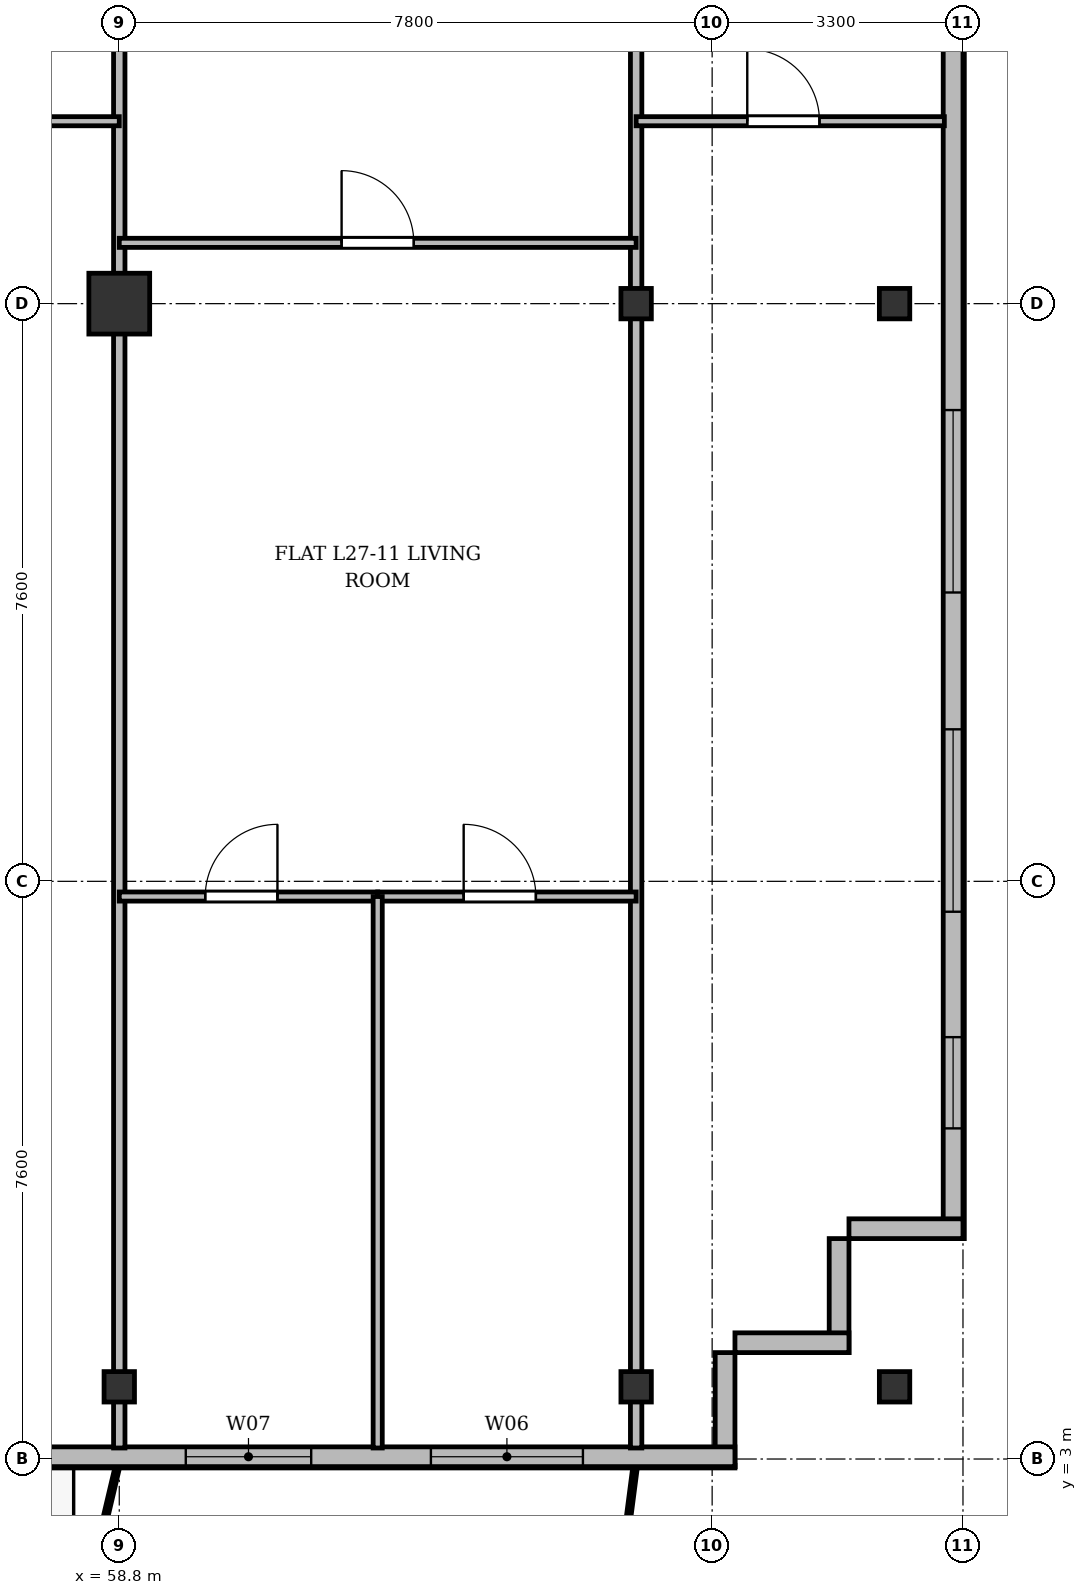
"""IFC4 building model, lengths in metres.
Left out: names, types, materials, properties, quantities, classifications, styles, units other than length and angle.
Written with IfcOpenShell. Run it as: python <this file> out.ifc"""

import sys

from ifc_helpers import new_model, si_unit, direction, frame, frame_2d, origin, origin_2d, place, context, subcontext, project, spatial, rectangle, i_section, extrude, source, transform, mapped, element, fill, save


model = new_model("IFC4")
c1 = context("Model", 3, precision=1e-05, world=origin(), true_north=direction((0.0, 1.0)))
c2 = subcontext(c1, "Body", "Model", "MODEL_VIEW")
j1 = project(units=[si_unit("LENGTHUNIT", "METRE"), si_unit("PLANEANGLEUNIT", "RADIAN")], contexts=[c1])
p1 = place(None, origin())
s1 = spatial("IfcSite", under=j1, at=p1, CompositionType="ELEMENT")
p2 = place(p1, origin())
s2 = spatial("IfcBuilding", under=s1, at=p2, CompositionType="ELEMENT")
p3 = place(p2, frame((0.0, 0.0, 106.9)))
s3 = spatial("IfcBuildingStorey", under=s2, at=p3, CompositionType="ELEMENT", Elevation=106.9)
m1 = source(origin(), c2, "Body", "SweptSolid", [
    extrude(i_section(OverallWidth=0.4, OverallDepth=0.4, WebThickness=0.022, FlangeThickness=0.035, at=origin_2d()), origin(), (0.0, 0.0, 1.0), 3.6),
])
p4 = place(p3, frame((58.8, 3.95, 0.0), z_axis=(0.0, 0.0, 1.0), x_axis=(1.0, 0.0, 0.0)))
e1 = element("IfcColumn", 1, at=p4, inside=s3, PredefinedType="COLUMN", context=c2, shape_type="MappedRepresentation", body=[
    mapped(m1, transform((0.0, 0.0, 0.0), x_axis=(1.0, 0.0, 0.0), y_axis=(0.0, 1.0, 0.0), z_axis=(0.0, 0.0, 1.0), scale=1.0)),
])
m2 = source(origin(), c2, "Body", "SweptSolid", [
    extrude(rectangle(XDim=0.8, YDim=0.8, at=origin_2d()), origin(), (0.0, 0.0, 1.0), 3.6),
])
p5 = place(p3, frame((58.8, 18.2, 0.0), z_axis=(0.0, 0.0, 1.0), x_axis=(1.0, 0.0, 0.0)))
e2 = element("IfcColumn", 2, at=p5, inside=s3, PredefinedType="COLUMN", context=c2, shape_type="MappedRepresentation", body=[
    mapped(m2, transform((0.0, 0.0, 0.0), x_axis=(1.0, 0.0, 0.0), y_axis=(0.0, 1.0, 0.0), z_axis=(0.0, 0.0, 1.0), scale=1.0)),
])
for number, where, z_axis, x_axis in (
    (3, (65.6, 3.95, 0.0), (0.0, 0.0, 1.0), (1.0, 0.0, 0.0)),
    (4, (65.6, 18.2, 0.0), (0.0, 0.0, 1.0), (1.0, 0.0, 0.0)),
    (5, (69.0, 3.95, 0.0), (0.0, 0.0, 1.0), (1.0, 0.0, 0.0)),
    (6, (69.0, 18.2, 0.0), (0.0, 0.0, 1.0), (1.0, 0.0, 0.0)),
):
    element("IfcColumn", number, at=place(p3, frame(where, z_axis=z_axis, x_axis=x_axis)), inside=s3, PredefinedType="COLUMN", context=c2, shape_type="MappedRepresentation", body=[
        mapped(m1, transform((0.0, 0.0, 0.0), x_axis=(1.0, 0.0, 0.0), y_axis=(0.0, 1.0, 0.0), z_axis=(0.0, 0.0, 1.0), scale=1.0)),
    ])
p6 = place(p3, frame((69.77, 45.5, 0.0), z_axis=(0.0, 0.0, 1.0), x_axis=(0.0, -1.0, 0.0)))
e7 = element("IfcWall", 7, at=p6, inside=s3, PredefinedType="SOLIDWALL", context=c2, shape_type="SweptSolid", body=[
    extrude(rectangle(XDim=39.6, YDim=0.26, at=frame_2d((19.8, 0.0))), origin(), (0.0, 0.0, 1.0), 3.34),
])
p7 = place(p6, frame((36.95, 0.0, 0.92)))
e8 = element("IfcOpeningElement", 8, at=p7, cuts=e7, PredefinedType="OPENING", context=c2, shape_type="SweptSolid", body=[
    extrude(rectangle(XDim=1.2, YDim=1.65, at=frame_2d((0.6, 0.825))), frame((0.0, 0.14, 0.0), z_axis=(0.0, -1.0, 0.0), x_axis=(1.0, 0.0, 0.0)), (0.0, 0.0, 1.0), 0.28),
])
p8 = place(p6, frame((32.9, 0.0, 0.92)))
e9 = element("IfcOpeningElement", 9, at=p8, cuts=e7, PredefinedType="OPENING", context=c2, shape_type="SweptSolid", body=[
    extrude(rectangle(XDim=2.4, YDim=2.1, at=frame_2d((1.2, 1.05))), frame((0.0, 0.14, 0.0), z_axis=(0.0, -1.0, 0.0), x_axis=(1.0, 0.0, 0.0)), (0.0, 0.0, 1.0), 0.28),
])
p9 = place(p6, frame((28.7, 0.0, 0.92)))
e10 = element("IfcOpeningElement", 10, at=p9, cuts=e7, PredefinedType="OPENING", context=c2, shape_type="SweptSolid", body=[
    extrude(rectangle(XDim=2.4, YDim=2.1, at=frame_2d((1.2, 1.05))), frame((0.0, 0.14, 0.0), z_axis=(0.0, -1.0, 0.0), x_axis=(1.0, 0.0, 0.0)), (0.0, 0.0, 1.0), 0.28),
])
p10 = place(p6, frame((21.5, 0.0, 0.92)))
e11 = element("IfcOpeningElement", 11, at=p10, cuts=e7, PredefinedType="OPENING", context=c2, shape_type="SweptSolid", body=[
    extrude(rectangle(XDim=2.4, YDim=2.1, at=frame_2d((1.2, 1.05))), frame((0.0, 0.14, 0.0), z_axis=(0.0, -1.0, 0.0), x_axis=(1.0, 0.0, 0.0)), (0.0, 0.0, 1.0), 0.28),
])
p11 = place(p6, frame((7.5, 0.0, 0.92)))
e12 = element("IfcOpeningElement", 12, at=p11, cuts=e7, PredefinedType="OPENING", context=c2, shape_type="SweptSolid", body=[
    extrude(rectangle(XDim=2.4, YDim=2.1, at=frame_2d((1.2, 1.05))), frame((0.0, 0.14, 0.0), z_axis=(0.0, -1.0, 0.0), x_axis=(1.0, 0.0, 0.0)), (0.0, 0.0, 1.0), 0.28),
])
p12 = place(p6, frame((4.5, 0.0, 0.92)))
e13 = element("IfcOpeningElement", 13, at=p12, cuts=e7, PredefinedType="OPENING", context=c2, shape_type="SweptSolid", body=[
    extrude(rectangle(XDim=1.2, YDim=1.65, at=frame_2d((0.6, 0.825))), frame((0.0, 0.14, 0.0), z_axis=(0.0, -1.0, 0.0), x_axis=(1.0, 0.0, 0.0)), (0.0, 0.0, 1.0), 0.28),
])
p13 = place(p6, frame((1.15, 0.0, 0.92)))
e14 = element("IfcOpeningElement", 14, at=p13, cuts=e7, PredefinedType="OPENING", context=c2, shape_type="SweptSolid", body=[
    extrude(rectangle(XDim=1.2, YDim=1.65, at=frame_2d((0.6, 0.825))), frame((0.0, 0.14, 0.0), z_axis=(0.0, -1.0, 0.0), x_axis=(1.0, 0.0, 0.0)), (0.0, 0.0, 1.0), 0.28),
])
p14 = place(p3, frame((69.9, 6.03, 0.0), z_axis=(0.0, 0.0, 1.0), x_axis=(-1.0, 0.0, 0.0)))
e15 = element("IfcWall", 15, at=p14, inside=s3, PredefinedType="SOLIDWALL", context=c2, shape_type="SweptSolid", body=[
    extrude(rectangle(XDim=1.5, YDim=0.26, at=frame_2d((0.75, 0.0))), origin(), (0.0, 0.0, 1.0), 2.84),
])
for number, where, z_axis, x_axis in (
    (16, (68.27, 5.9, 0.0), (0.0, 0.0, 1.0), (0.0, -1.0, 0.0)),
    (17, (68.4, 4.53, 0.0), (0.0, 0.0, 1.0), (-1.0, 0.0, 0.0)),
):
    element("IfcWall", number, at=place(p3, frame(where, z_axis=z_axis, x_axis=x_axis)), inside=s3, PredefinedType="SOLIDWALL", context=c2, shape_type="SweptSolid", body=[
        extrude(rectangle(XDim=1.5, YDim=0.26, at=frame_2d((0.75, 0.0))), origin(), (0.0, 0.0, 1.0), 3.34),
    ])
p15 = place(p3, frame((66.77, 4.4, 0.0), z_axis=(0.0, 0.0, 1.0), x_axis=(0.0, -1.0, 0.0)))
e18 = element("IfcWall", 18, at=p15, inside=s3, PredefinedType="SOLIDWALL", context=c2, shape_type="SweptSolid", body=[
    extrude(rectangle(XDim=1.5, YDim=0.26, at=frame_2d((0.75, 0.0))), origin(), (0.0, 0.0, 1.0), 2.752),
])
p16 = place(p3, frame((66.9, 3.03, 0.0), z_axis=(0.0, 0.0, 1.0), x_axis=(-1.0, 0.0, 0.0)))
e19 = element("IfcWall", 19, at=p16, inside=s3, PredefinedType="SOLIDWALL", context=c2, shape_type="SweptSolid", body=[
    extrude(rectangle(XDim=59.4, YDim=0.26, at=frame_2d((29.7, 0.0))), origin(), (0.0, 0.0, 1.0), 3.34),
])
p17 = place(p16, frame((2.0, 0.0, 0.9)))
e20 = element("IfcOpeningElement", 20, at=p17, cuts=e19, PredefinedType="OPENING", context=c2, shape_type="SweptSolid", body=[
    extrude(rectangle(XDim=2.0, YDim=1.95, at=frame_2d((1.0, 0.975))), frame((0.0, 0.14, 0.0), z_axis=(0.0, -1.0, 0.0), x_axis=(1.0, 0.0, 0.0)), (0.0, 0.0, 1.0), 0.28),
])
p18 = place(p16, frame((5.575, 0.0, 0.9)))
e21 = element("IfcOpeningElement", 21, at=p18, cuts=e19, PredefinedType="OPENING", context=c2, shape_type="SweptSolid", body=[
    extrude(rectangle(XDim=1.65, YDim=1.85, at=frame_2d((0.825, 0.925))), frame((0.0, 0.14, 0.0), z_axis=(0.0, -1.0, 0.0), x_axis=(1.0, 0.0, 0.0)), (0.0, 0.0, 1.0), 0.28),
])
p19 = place(p16, frame((9.213, 0.0, 0.0)))
e22 = element("IfcOpeningElement", 22, at=p19, cuts=e19, PredefinedType="OPENING", context=c2, shape_type="SweptSolid", body=[
    extrude(rectangle(XDim=1.2, YDim=2.2, at=frame_2d((0.6, 1.1))), frame((0.0, 0.14, 0.0), z_axis=(0.0, -1.0, 0.0), x_axis=(1.0, 0.0, 0.0)), (0.0, 0.0, 1.0), 0.28),
])
p20 = place(p16, frame((12.8, 0.0, 0.9)))
e23 = element("IfcOpeningElement", 23, at=p20, cuts=e19, PredefinedType="OPENING", context=c2, shape_type="SweptSolid", body=[
    extrude(rectangle(XDim=2.2, YDim=1.8, at=frame_2d((1.1, 0.9))), frame((0.0, 0.14, 0.0), z_axis=(0.0, -1.0, 0.0), x_axis=(1.0, 0.0, 0.0)), (0.0, 0.0, 1.0), 0.28),
])
p21 = place(p16, frame((16.95, 0.0, 0.9)))
e24 = element("IfcOpeningElement", 24, at=p21, cuts=e19, PredefinedType="OPENING", context=c2, shape_type="SweptSolid", body=[
    extrude(rectangle(XDim=1.5, YDim=1.75, at=frame_2d((0.75, 0.875))), frame((0.0, 0.14, 0.0), z_axis=(0.0, -1.0, 0.0), x_axis=(1.0, 0.0, 0.0)), (0.0, 0.0, 1.0), 0.28),
])
p22 = place(p16, frame((20.3, 0.0, 0.9)))
e25 = element("IfcOpeningElement", 25, at=p22, cuts=e19, PredefinedType="OPENING", context=c2, shape_type="SweptSolid", body=[
    extrude(rectangle(XDim=2.0, YDim=1.95, at=frame_2d((1.0, 0.975))), frame((0.0, 0.14, 0.0), z_axis=(0.0, -1.0, 0.0), x_axis=(1.0, 0.0, 0.0)), (0.0, 0.0, 1.0), 0.28),
])
p23 = place(p16, frame((25.575, 0.0, 0.9)))
e26 = element("IfcOpeningElement", 26, at=p23, cuts=e19, PredefinedType="OPENING", context=c2, shape_type="SweptSolid", body=[
    extrude(rectangle(XDim=1.65, YDim=1.85, at=frame_2d((0.825, 0.925))), frame((0.0, 0.14, 0.0), z_axis=(0.0, -1.0, 0.0), x_axis=(1.0, 0.0, 0.0)), (0.0, 0.0, 1.0), 0.28),
])
p24 = place(p16, frame((32.1, 0.0, 0.9)))
e27 = element("IfcOpeningElement", 27, at=p24, cuts=e19, PredefinedType="OPENING", context=c2, shape_type="SweptSolid", body=[
    extrude(rectangle(XDim=1.8, YDim=1.8, at=frame_2d((0.9, 0.9))), frame((0.0, 0.14, 0.0), z_axis=(0.0, -1.0, 0.0), x_axis=(1.0, 0.0, 0.0)), (0.0, 0.0, 1.0), 0.28),
])
p25 = place(p16, frame((37.584, 0.0, 0.0)))
e28 = element("IfcOpeningElement", 28, at=p25, cuts=e19, PredefinedType="OPENING", context=c2, shape_type="SweptSolid", body=[
    extrude(rectangle(XDim=1.2, YDim=2.2, at=frame_2d((0.6, 1.1))), frame((0.0, 0.14, 0.0), z_axis=(0.0, -1.0, 0.0), x_axis=(1.0, 0.0, 0.0)), (0.0, 0.0, 1.0), 0.28),
])
p26 = place(p16, frame((40.85, 0.0, 0.9)))
e29 = element("IfcOpeningElement", 29, at=p26, cuts=e19, PredefinedType="OPENING", context=c2, shape_type="SweptSolid", body=[
    extrude(rectangle(XDim=1.5, YDim=1.75, at=frame_2d((0.75, 0.875))), frame((0.0, 0.14, 0.0), z_axis=(0.0, -1.0, 0.0), x_axis=(1.0, 0.0, 0.0)), (0.0, 0.0, 1.0), 0.28),
])
p27 = place(p16, frame((46.4, 0.0, 0.9)))
e30 = element("IfcOpeningElement", 30, at=p27, cuts=e19, PredefinedType="OPENING", context=c2, shape_type="SweptSolid", body=[
    extrude(rectangle(XDim=2.0, YDim=1.95, at=frame_2d((1.0, 0.975))), frame((0.0, 0.14, 0.0), z_axis=(0.0, -1.0, 0.0), x_axis=(1.0, 0.0, 0.0)), (0.0, 0.0, 1.0), 0.28),
])
p28 = place(p16, frame((55.817, 0.0, 0.0)))
e31 = element("IfcOpeningElement", 31, at=p28, cuts=e19, PredefinedType="OPENING", context=c2, shape_type="SweptSolid", body=[
    extrude(rectangle(XDim=1.2, YDim=2.2, at=frame_2d((0.6, 1.1))), frame((0.0, 0.14, 0.0), z_axis=(0.0, -1.0, 0.0), x_axis=(1.0, 0.0, 0.0)), (0.0, 0.0, 1.0), 0.28),
])
for number, where, z_axis, x_axis in (
    (32, (58.8, 3.145, 0.0), (0.0, 0.0, 1.0), (0.0, 1.0, 0.0)),
    (33, (65.6, 3.145, 0.0), (0.0, 0.0, 1.0), (0.0, 1.0, 0.0)),
):
    element("IfcWall", number, at=place(p3, frame(where, z_axis=z_axis, x_axis=x_axis)), inside=s3, PredefinedType="PARTITIONING", context=c2, shape_type="SweptSolid", body=[
        extrude(rectangle(XDim=24.455, YDim=0.15, at=frame_2d((12.228, 0.0))), origin(), (0.0, 0.0, 1.0), 2.84),
    ])
p29 = place(p3, frame((55.0, 20.6, 0.0), z_axis=(0.0, 0.0, 1.0), x_axis=(1.0, 0.0, 0.0)))
e34 = element("IfcWall", 34, at=p29, inside=s3, PredefinedType="PARTITIONING", context=c2, shape_type="SweptSolid", body=[
    extrude(rectangle(XDim=3.8, YDim=0.12, at=frame_2d((1.9, 0.0))), origin(), (0.0, 0.0, 1.0), 2.84),
])
p30 = place(p29, frame((1.33, 0.0, 0.0)))
e35 = element("IfcOpeningElement", 35, at=p30, cuts=e34, PredefinedType="OPENING", context=c2, shape_type="SweptSolid", body=[
    extrude(rectangle(XDim=0.95, YDim=2.15, at=frame_2d((0.475, 1.075))), frame((0.0, 0.07, 0.0), z_axis=(0.0, -1.0, 0.0), x_axis=(1.0, 0.0, 0.0)), (0.0, 0.0, 1.0), 0.14),
])
p31 = place(p3, frame((58.8, 19.0, 0.0), z_axis=(0.0, 0.0, 1.0), x_axis=(1.0, 0.0, 0.0)))
e36 = element("IfcWall", 36, at=p31, inside=s3, PredefinedType="PARTITIONING", context=c2, shape_type="SweptSolid", body=[
    extrude(rectangle(XDim=6.8, YDim=0.12, at=frame_2d((3.4, 0.0))), origin(), (0.0, 0.0, 1.0), 2.84),
])
p32 = place(p31, frame((2.925, 0.0, 0.0)))
e37 = element("IfcOpeningElement", 37, at=p32, cuts=e36, PredefinedType="OPENING", context=c2, shape_type="SweptSolid", body=[
    extrude(rectangle(XDim=0.95, YDim=2.15, at=frame_2d((0.475, 1.075))), frame((0.0, 0.07, 0.0), z_axis=(0.0, -1.0, 0.0), x_axis=(1.0, 0.0, 0.0)), (0.0, 0.0, 1.0), 0.14),
])
p33 = place(p3, frame((58.8, 10.4, 0.0), z_axis=(0.0, 0.0, 1.0), x_axis=(1.0, 0.0, 0.0)))
e38 = element("IfcWall", 38, at=p33, inside=s3, PredefinedType="PARTITIONING", context=c2, shape_type="SweptSolid", body=[
    extrude(rectangle(XDim=3.4, YDim=0.12, at=frame_2d((1.7, 0.0))), origin(), (0.0, 0.0, 1.0), 2.84),
])
p34 = place(p33, frame((1.131, 0.0, 0.0)))
e39 = element("IfcOpeningElement", 39, at=p34, cuts=e38, PredefinedType="OPENING", context=c2, shape_type="SweptSolid", body=[
    extrude(rectangle(XDim=0.95, YDim=2.15, at=frame_2d((0.475, 1.075))), frame((0.0, 0.07, 0.0), z_axis=(0.0, -1.0, 0.0), x_axis=(1.0, 0.0, 0.0)), (0.0, 0.0, 1.0), 0.14),
])
p35 = place(p3, frame((62.2, 10.4, 0.0), z_axis=(0.0, 0.0, 1.0), x_axis=(1.0, 0.0, 0.0)))
e40 = element("IfcWall", 40, at=p35, inside=s3, PredefinedType="PARTITIONING", context=c2, shape_type="SweptSolid", body=[
    extrude(rectangle(XDim=3.4, YDim=0.12, at=frame_2d((1.7, 0.0))), origin(), (0.0, 0.0, 1.0), 2.84),
])
p36 = place(p35, frame((1.131, 0.0, 0.0)))
e41 = element("IfcOpeningElement", 41, at=p36, cuts=e40, PredefinedType="OPENING", context=c2, shape_type="SweptSolid", body=[
    extrude(rectangle(XDim=0.95, YDim=2.15, at=frame_2d((0.475, 1.075))), frame((0.0, 0.07, 0.0), z_axis=(0.0, -1.0, 0.0), x_axis=(1.0, 0.0, 0.0)), (0.0, 0.0, 1.0), 0.14),
])
p37 = place(p3, frame((62.2, 3.145, 0.0), z_axis=(0.0, 0.0, 1.0), x_axis=(0.0, 1.0, 0.0)))
e42 = element("IfcWall", 42, at=p37, inside=s3, PredefinedType="PARTITIONING", context=c2, shape_type="SweptSolid", body=[
    extrude(rectangle(XDim=7.255, YDim=0.12, at=frame_2d((3.627, 0.0))), origin(), (0.0, 0.0, 1.0), 2.752),
])
p38 = place(p3, frame((65.6, 20.6, 0.0), z_axis=(0.0, 0.0, 1.0), x_axis=(1.0, 0.0, 0.0)))
e43 = element("IfcWall", 43, at=p38, inside=s3, PredefinedType="PARTITIONING", context=c2, shape_type="SweptSolid", body=[
    extrude(rectangle(XDim=4.055, YDim=0.12, at=frame_2d((2.027, 0.0))), origin(), (0.0, 0.0, 1.0), 2.84),
])
p39 = place(p38, frame((1.462, 0.0, 0.0)))
e44 = element("IfcOpeningElement", 44, at=p39, cuts=e43, PredefinedType="OPENING", context=c2, shape_type="SweptSolid", body=[
    extrude(rectangle(XDim=0.95, YDim=2.15, at=frame_2d((0.475, 1.075))), frame((0.0, 0.07, 0.0), z_axis=(0.0, -1.0, 0.0), x_axis=(1.0, 0.0, 0.0)), (0.0, 0.0, 1.0), 0.14),
])
m3 = source(origin(), c2, "Body", "SweptSolid", [
    extrude(rectangle(XDim=1.2, YDim=1.65, at=frame_2d((0.6, 0.825))), frame((0.0, 0.03, 0.0), z_axis=(0.0, -1.0, 0.0), x_axis=(1.0, 0.0, 0.0)), (0.0, 0.0, 1.0), 0.06),
])
p40 = place(p7, origin())
e45 = element("IfcWindow", 45, at=p40, inside=s3, PartitioningType="SINGLE_PANEL", PredefinedType="WINDOW", context=c2, shape_type="MappedRepresentation", body=[
    mapped(m3, transform((0.0, 0.0, 0.0), x_axis=(1.0, 0.0, 0.0), y_axis=(0.0, 1.0, 0.0), z_axis=(0.0, 0.0, 1.0), scale=1.0)),
])
fill(e8, e45)
m4 = source(origin(), c2, "Body", "SweptSolid", [
    extrude(rectangle(XDim=2.4, YDim=2.1, at=frame_2d((1.2, 1.05))), frame((0.0, 0.03, 0.0), z_axis=(0.0, -1.0, 0.0), x_axis=(1.0, 0.0, 0.0)), (0.0, 0.0, 1.0), 0.06),
])
p41 = place(p8, origin())
e46 = element("IfcWindow", 46, at=p41, inside=s3, PartitioningType="SINGLE_PANEL", PredefinedType="WINDOW", context=c2, shape_type="MappedRepresentation", body=[
    mapped(m4, transform((0.0, 0.0, 0.0), x_axis=(1.0, 0.0, 0.0), y_axis=(0.0, 1.0, 0.0), z_axis=(0.0, 0.0, 1.0), scale=1.0)),
])
fill(e9, e46)
p42 = place(p9, origin())
e47 = element("IfcWindow", 47, at=p42, inside=s3, PartitioningType="SINGLE_PANEL", PredefinedType="WINDOW", context=c2, shape_type="MappedRepresentation", body=[
    mapped(m4, transform((0.0, 0.0, 0.0), x_axis=(1.0, 0.0, 0.0), y_axis=(0.0, 1.0, 0.0), z_axis=(0.0, 0.0, 1.0), scale=1.0)),
])
fill(e10, e47)
m5 = source(origin(), c2, "Body", "SweptSolid", [
    extrude(rectangle(XDim=2.0, YDim=1.95, at=frame_2d((1.0, 0.975))), frame((0.0, 0.03, 0.0), z_axis=(0.0, -1.0, 0.0), x_axis=(1.0, 0.0, 0.0)), (0.0, 0.0, 1.0), 0.06),
])
p43 = place(p17, origin())
e48 = element("IfcWindow", 48, at=p43, inside=s3, PartitioningType="SINGLE_PANEL", PredefinedType="WINDOW", context=c2, shape_type="MappedRepresentation", body=[
    mapped(m5, transform((0.0, 0.0, 0.0), x_axis=(1.0, 0.0, 0.0), y_axis=(0.0, 1.0, 0.0), z_axis=(0.0, 0.0, 1.0), scale=1.0)),
])
fill(e20, e48)
m6 = source(origin(), c2, "Body", "SweptSolid", [
    extrude(rectangle(XDim=1.65, YDim=1.85, at=frame_2d((0.825, 0.925))), frame((0.0, 0.03, 0.0), z_axis=(0.0, -1.0, 0.0), x_axis=(1.0, 0.0, 0.0)), (0.0, 0.0, 1.0), 0.06),
])
p44 = place(p18, origin())
e49 = element("IfcWindow", 49, at=p44, inside=s3, PartitioningType="SINGLE_PANEL", PredefinedType="WINDOW", context=c2, shape_type="MappedRepresentation", body=[
    mapped(m6, transform((0.0, 0.0, 0.0), x_axis=(1.0, 0.0, 0.0), y_axis=(0.0, 1.0, 0.0), z_axis=(0.0, 0.0, 1.0), scale=1.0)),
])
fill(e21, e49)
m7 = source(origin(), c2, "Body", "SweptSolid", [
    extrude(rectangle(XDim=0.95, YDim=2.15, at=frame_2d((0.475, 1.075))), frame((0.0, 0.025, 0.0), z_axis=(0.0, -1.0, 0.0), x_axis=(1.0, 0.0, 0.0)), (0.0, 0.0, 1.0), 0.05),
])
p45 = place(p32, origin())
e50 = element("IfcDoor", 50, at=p45, inside=s3, OperationType="SINGLE_SWING_LEFT", PredefinedType="DOOR", context=c2, shape_type="MappedRepresentation", body=[
    mapped(m7, transform((0.0, 0.0, 0.0), x_axis=(1.0, 0.0, 0.0), y_axis=(0.0, 1.0, 0.0), z_axis=(0.0, 0.0, 1.0), scale=1.0)),
])
fill(e37, e50)
p46 = place(p34, origin())
e51 = element("IfcDoor", 51, at=p46, inside=s3, OperationType="SINGLE_SWING_RIGHT", PredefinedType="DOOR", context=c2, shape_type="MappedRepresentation", body=[
    mapped(m7, transform((0.0, 0.0, 0.0), x_axis=(1.0, 0.0, 0.0), y_axis=(0.0, 1.0, 0.0), z_axis=(0.0, 0.0, 1.0), scale=1.0)),
])
fill(e39, e51)
p47 = place(p36, origin())
e52 = element("IfcDoor", 52, at=p47, inside=s3, OperationType="SINGLE_SWING_LEFT", PredefinedType="DOOR", context=c2, shape_type="MappedRepresentation", body=[
    mapped(m7, transform((0.0, 0.0, 0.0), x_axis=(1.0, 0.0, 0.0), y_axis=(0.0, 1.0, 0.0), z_axis=(0.0, 0.0, 1.0), scale=1.0)),
])
fill(e41, e52)
p48 = place(p39, origin())
e53 = element("IfcDoor", 53, at=p48, inside=s3, OperationType="SINGLE_SWING_LEFT", PredefinedType="DOOR", context=c2, shape_type="MappedRepresentation", body=[
    mapped(m7, transform((0.0, 0.0, 0.0), x_axis=(1.0, 0.0, 0.0), y_axis=(0.0, 1.0, 0.0), z_axis=(0.0, 0.0, 1.0), scale=1.0)),
])
fill(e44, e53)
save(model, sys.argv[1])
